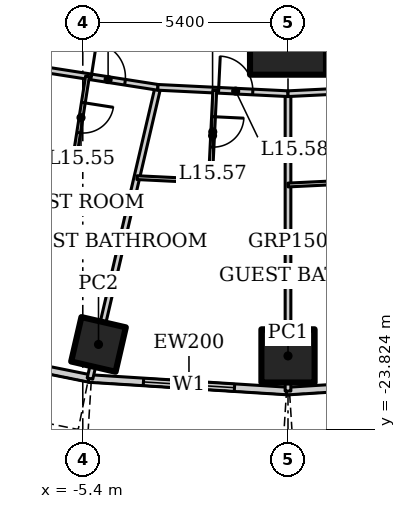
"""IFC4 building model, lengths in metres.
Left out: names, types, materials, properties, quantities, classifications, styles, units other than length and angle.
Written with IfcOpenShell. Run it as: python <this file> out.ifc"""

import sys

from ifc_helpers import new_model, si_unit, direction, frame, frame_2d, origin, origin_2d, place, context, subcontext, project, spatial, rectangle, hollow_rectangle, extrude, element, fill, save


model = new_model("IFC4")
c1 = context("Model", 3, precision=1e-05, world=origin(), true_north=direction((0.0, 1.0)))
c2 = subcontext(c1, "Body", "Model", "MODEL_VIEW")
j1 = project(units=[si_unit("LENGTHUNIT", "METRE"), si_unit("PLANEANGLEUNIT", "RADIAN")], contexts=[c1])
p1 = place(None, origin())
s1 = spatial("IfcSite", under=j1, at=p1, CompositionType="ELEMENT")
p2 = place(p1, origin())
s2 = spatial("IfcBuilding", under=s1, at=p2, CompositionType="ELEMENT")
p3 = place(p2, frame((0.0, 0.0, 69.4)))
s3 = spatial("IfcBuildingStorey", under=s2, at=p3, CompositionType="ELEMENT", Elevation=69.4)
p4 = place(p3, frame((0.0, -13.5, 0.0), z_axis=(0.0, 0.0, 1.0), x_axis=(1.0, 0.0, 0.0)))
e1 = element("IfcColumn", 1, at=p4, inside=s3, PredefinedType="COLUMN", context=c2, shape_type="SweptSolid", body=[
    extrude(hollow_rectangle(XDim=2.0, YDim=2.0, WallThickness=0.17, at=origin_2d()), origin(), (0.0, 0.0, 1.0), 3.6),
])
p5 = place(p3, frame((-4.986, -21.598, 0.0), z_axis=(0.0, 0.0, 1.0), x_axis=(0.224951054344, 0.974370064785, 0.0)))
e2 = element("IfcColumn", 2, at=p5, inside=s3, PredefinedType="COLUMN", context=c2, shape_type="SweptSolid", body=[
    extrude(hollow_rectangle(XDim=1.2, YDim=1.2, WallThickness=0.1, at=origin_2d()), origin(), (0.0, 0.0, 1.0), 3.6),
])
p6 = place(p3, frame((0.0, -21.9, 0.0), z_axis=(0.0, 0.0, 1.0), x_axis=(1.0, 0.0, 0.0)))
e3 = element("IfcColumn", 3, at=p6, inside=s3, PredefinedType="COLUMN", context=c2, shape_type="SweptSolid", body=[
    extrude(hollow_rectangle(XDim=1.4, YDim=1.4, WallThickness=0.1, at=origin_2d()), origin(), (0.0, 0.0, 1.0), 3.6),
])
p7 = place(p3, frame((-10.957, -21.337, 0.0), z_axis=(0.0, 0.0, 1.0), x_axis=(0.980251657452, -0.197754110105, 0.0)))
e4 = element("IfcWall", 4, at=p7, inside=s3, PredefinedType="SOLIDWALL", context=c2, shape_type="SweptSolid", body=[
    extrude(rectangle(XDim=5.904, YDim=0.2, at=frame_2d((2.952, 0.0))), origin(), (0.0, 0.0, 1.0), 3.45),
])
p8 = place(p7, frame((1.752, 0.0, 0.5)))
e5 = element("IfcOpeningElement", 5, at=p8, cuts=e4, PredefinedType="OPENING", context=c2, shape_type="SweptSolid", body=[
    extrude(rectangle(XDim=2.4, YDim=2.2, at=frame_2d((1.2, 1.1))), frame((0.0, 0.11, 0.0), z_axis=(0.0, -1.0, 0.0), x_axis=(1.0, 0.0, 0.0)), (0.0, 0.0, 1.0), 0.22),
])
p9 = place(p3, frame((-5.253, -22.493, 0.0), z_axis=(0.0, 0.0, 1.0), x_axis=(0.998018582375, -0.062919863585, 0.0)))
e6 = element("IfcWall", 6, at=p9, inside=s3, PredefinedType="SOLIDWALL", context=c2, shape_type="SweptSolid", body=[
    extrude(rectangle(XDim=5.304, YDim=0.2, at=frame_2d((2.652, 0.0))), origin(), (0.0, 0.0, 1.0), 3.45),
])
p10 = place(p9, frame((1.452, 0.0, 0.5)))
e7 = element("IfcOpeningElement", 7, at=p10, cuts=e6, PredefinedType="OPENING", context=c2, shape_type="SweptSolid", body=[
    extrude(rectangle(XDim=2.4, YDim=2.2, at=frame_2d((1.2, 1.1))), frame((0.0, 0.11, 0.0), z_axis=(0.0, -1.0, 0.0), x_axis=(1.0, 0.0, 0.0)), (0.0, 0.0, 1.0), 0.22),
])
p11 = place(p3, frame((-0.041, -22.827, 0.0), z_axis=(0.0, 0.0, 1.0), x_axis=(0.998018582375, 0.062919863585, 0.0)))
e8 = element("IfcWall", 8, at=p11, inside=s3, PredefinedType="SOLIDWALL", context=c2, shape_type="SweptSolid", body=[
    extrude(rectangle(XDim=5.304, YDim=0.2, at=frame_2d((2.652, 0.0))), origin(), (0.0, 0.0, 1.0), 3.45),
])
p12 = place(p11, frame((1.452, 0.0, 0.5)))
e9 = element("IfcOpeningElement", 9, at=p12, cuts=e8, PredefinedType="OPENING", context=c2, shape_type="SweptSolid", body=[
    extrude(rectangle(XDim=2.4, YDim=2.2, at=frame_2d((1.2, 1.1))), frame((0.0, 0.11, 0.0), z_axis=(0.0, -1.0, 0.0), x_axis=(1.0, 0.0, 0.0)), (0.0, 0.0, 1.0), 0.22),
])
p13 = place(p3, frame((-5.211, -22.496, 0.0), z_axis=(0.0, 0.0, 1.0), x_axis=(0.227056984461, 0.973881474209, 0.0)))
e10 = element("IfcWall", 10, at=p13, inside=s3, PredefinedType="PARTITIONING", context=c2, shape_type="SweptSolid", body=[
    extrude(rectangle(XDim=7.869, YDim=0.15, at=frame_2d((3.934, 0.0))), origin(), (0.0, 0.0, 1.0), 2.767),
])
p14 = place(p3, frame((0.0, -22.825, 0.0), z_axis=(0.0, 0.0, 1.0), x_axis=(0.0, 1.0, 0.0)))
e11 = element("IfcWall", 11, at=p14, inside=s3, PredefinedType="PARTITIONING", context=c2, shape_type="SweptSolid", body=[
    extrude(rectangle(XDim=7.825, YDim=0.15, at=frame_2d((3.912, 0.0))), origin(), (0.0, 0.0, 1.0), 2.924),
])
p15 = place(p3, frame((-7.253, -14.235, 0.0), z_axis=(0.0, 0.0, 1.0), x_axis=(0.988015036573, -0.154357660987, 0.0)))
e12 = element("IfcWall", 12, at=p15, inside=s3, PredefinedType="PARTITIONING", context=c2, shape_type="SweptSolid", body=[
    extrude(rectangle(XDim=3.875, YDim=0.15, at=frame_2d((1.938, 0.0))), origin(), (0.0, 0.0, 1.0), 3.45),
])
p16 = place(p15, frame((2.1, 0.0, 0.0)))
e13 = element("IfcOpeningElement", 13, at=p16, cuts=e12, PredefinedType="OPENING", context=c2, shape_type="SweptSolid", body=[
    extrude(rectangle(XDim=0.9, YDim=2.1, at=frame_2d((0.45, 1.05))), frame((0.0, 0.085, 0.0), z_axis=(0.0, -1.0, 0.0), x_axis=(1.0, 0.0, 0.0)), (0.0, 0.0, 1.0), 0.17),
])
p17 = place(p3, frame((-3.424, -14.833, 0.0), z_axis=(0.0, 0.0, 1.0), x_axis=(0.998809560203, -0.048779733975, 0.0)))
e14 = element("IfcWall", 14, at=p17, inside=s3, PredefinedType="PARTITIONING", context=c2, shape_type="SweptSolid", body=[
    extrude(rectangle(XDim=3.428, YDim=0.15, at=frame_2d((1.714, 0.0))), origin(), (0.0, 0.0, 1.0), 3.45),
])
p18 = place(p17, frame((1.6, 0.0, 0.0)))
e15 = element("IfcOpeningElement", 15, at=p18, cuts=e14, PredefinedType="OPENING", context=c2, shape_type="SweptSolid", body=[
    extrude(rectangle(XDim=0.9, YDim=2.1, at=frame_2d((0.45, 1.05))), frame((0.0, 0.085, 0.0), z_axis=(0.0, -1.0, 0.0), x_axis=(1.0, 0.0, 0.0)), (0.0, 0.0, 1.0), 0.17),
])
p19 = place(p3, frame((0.0, -15.0, 0.0), z_axis=(0.0, 0.0, 1.0), x_axis=(0.998809560203, 0.048779733975, 0.0)))
e16 = element("IfcWall", 16, at=p19, inside=s3, PredefinedType="PARTITIONING", context=c2, shape_type="SweptSolid", body=[
    extrude(rectangle(XDim=3.428, YDim=0.15, at=frame_2d((1.714, 0.0))), origin(), (0.0, 0.0, 1.0), 3.45),
])
p20 = place(p19, frame((2.378, 0.0, 0.0)))
e17 = element("IfcOpeningElement", 17, at=p20, cuts=e16, PredefinedType="OPENING", context=c2, shape_type="SweptSolid", body=[
    extrude(rectangle(XDim=0.9, YDim=2.1, at=frame_2d((0.45, 1.05))), frame((0.0, 0.085, 0.0), z_axis=(0.0, -1.0, 0.0), x_axis=(1.0, 0.0, 0.0)), (0.0, 0.0, 1.0), 0.17),
])
p21 = place(p3, frame((-5.277, -14.543, 0.0), z_axis=(0.0, 0.0, 1.0), x_axis=(-0.154426532979, -0.988004274238, 0.0)))
e18 = element("IfcWall", 18, at=p21, inside=s3, PredefinedType="PARTITIONING", context=c2, shape_type="SweptSolid", body=[
    extrude(rectangle(XDim=2.4, YDim=0.1, at=frame_2d((1.2, 0.0))), origin(), (0.0, 0.0, 1.0), 3.45),
])
p22 = place(p21, frame((0.7, 0.0, 0.0)))
e19 = element("IfcOpeningElement", 19, at=p22, cuts=e18, PredefinedType="OPENING", context=c2, shape_type="SweptSolid", body=[
    extrude(rectangle(XDim=0.8, YDim=2.1, at=frame_2d((0.4, 1.05))), frame((0.0, 0.06, 0.0), z_axis=(0.0, -1.0, 0.0), x_axis=(1.0, 0.0, 0.0)), (0.0, 0.0, 1.0), 0.12),
])
p23 = place(p3, frame((-5.647, -16.915, 0.0), z_axis=(0.0, 0.0, 1.0), x_axis=(-0.988015375833, 0.154355489429, 0.0)))
e20 = element("IfcWall", 20, at=p23, inside=s3, PredefinedType="PARTITIONING", context=c2, shape_type="SweptSolid", body=[
    extrude(rectangle(XDim=2.785, YDim=0.1, at=frame_2d((1.393, 0.0))), origin(), (0.0, 0.0, 1.0), 3.45),
])
p24 = place(p3, frame((-1.926, -14.906, 0.0), z_axis=(0.0, 0.0, 1.0), x_axis=(-0.048725028858, -0.998812230383, 0.0)))
e21 = element("IfcWall", 21, at=p24, inside=s3, PredefinedType="PARTITIONING", context=c2, shape_type="SweptSolid", body=[
    extrude(rectangle(XDim=2.4, YDim=0.1, at=frame_2d((1.2, 0.0))), origin(), (0.0, 0.0, 1.0), 2.749),
])
p25 = place(p24, frame((0.7, 0.0, 0.0)))
e22 = element("IfcOpeningElement", 22, at=p25, cuts=e21, PredefinedType="OPENING", context=c2, shape_type="SweptSolid", body=[
    extrude(rectangle(XDim=0.8, YDim=2.1, at=frame_2d((0.4, 1.05))), frame((0.0, 0.06, 0.0), z_axis=(0.0, -1.0, 0.0), x_axis=(1.0, 0.0, 0.0)), (0.0, 0.0, 1.0), 0.12),
])
p26 = place(p3, frame((-2.043, -17.303, 0.0), z_axis=(0.0, 0.0, 1.0), x_axis=(-0.998809649749, 0.048777900405, 0.0)))
e23 = element("IfcWall", 23, at=p26, inside=s3, PredefinedType="PARTITIONING", context=c2, shape_type="SweptSolid", body=[
    extrude(rectangle(XDim=1.932, YDim=0.1, at=frame_2d((0.966, 0.0))), origin(), (0.0, 0.0, 1.0), 3.45),
])
p27 = place(p3, frame((2.115, -17.3, 0.0), z_axis=(0.0, 0.0, 1.0), x_axis=(-0.998809749254, -0.048775862842, 0.0)))
e24 = element("IfcWall", 24, at=p27, inside=s3, PredefinedType="PARTITIONING", context=c2, shape_type="SweptSolid", body=[
    extrude(rectangle(XDim=2.117, YDim=0.1, at=frame_2d((1.059, 0.0))), origin(), (0.0, 0.0, 1.0), 3.45),
])
p28 = place(p10, origin())
e25 = element("IfcWindow", 25, at=p28, inside=s3, PartitioningType="SINGLE_PANEL", PredefinedType="WINDOW", context=c2, shape_type="SweptSolid", body=[
    extrude(rectangle(XDim=2.4, YDim=2.2, at=frame_2d((1.2, 1.1))), frame((0.0, 0.03, 0.0), z_axis=(0.0, -1.0, 0.0), x_axis=(1.0, 0.0, 0.0)), (0.0, 0.0, 1.0), 0.06),
])
fill(e7, e25)
p29 = place(p22, origin())
e26 = element("IfcDoor", 26, at=p29, inside=s3, OperationType="SINGLE_SWING_LEFT", PredefinedType="DOOR", context=c2, shape_type="SweptSolid", body=[
    extrude(rectangle(XDim=0.8, YDim=2.1, at=frame_2d((0.4, 1.05))), frame((0.0, 0.025, 0.0), z_axis=(0.0, -1.0, 0.0), x_axis=(1.0, 0.0, 0.0)), (0.0, 0.0, 1.0), 0.05),
])
fill(e19, e26)
p30 = place(p16, origin())
e27 = element("IfcDoor", 27, at=p30, inside=s3, OperationType="SINGLE_SWING_LEFT", PredefinedType="DOOR", context=c2, shape_type="SweptSolid", body=[
    extrude(rectangle(XDim=0.9, YDim=2.1, at=frame_2d((0.45, 1.05))), frame((0.0, 0.025, 0.0), z_axis=(0.0, -1.0, 0.0), x_axis=(1.0, 0.0, 0.0)), (0.0, 0.0, 1.0), 0.05),
])
fill(e13, e27)
p31 = place(p25, origin())
e28 = element("IfcDoor", 28, at=p31, inside=s3, OperationType="SINGLE_SWING_LEFT", PredefinedType="DOOR", context=c2, shape_type="SweptSolid", body=[
    extrude(rectangle(XDim=0.8, YDim=2.1, at=frame_2d((0.4, 1.05))), frame((0.0, 0.025, 0.0), z_axis=(0.0, -1.0, 0.0), x_axis=(1.0, 0.0, 0.0)), (0.0, 0.0, 1.0), 0.05),
])
fill(e22, e28)
p32 = place(p18, origin())
e29 = element("IfcDoor", 29, at=p32, inside=s3, OperationType="SINGLE_SWING_LEFT", PredefinedType="DOOR", context=c2, shape_type="SweptSolid", body=[
    extrude(rectangle(XDim=0.9, YDim=2.1, at=frame_2d((0.45, 1.05))), frame((0.0, 0.025, 0.0), z_axis=(0.0, -1.0, 0.0), x_axis=(1.0, 0.0, 0.0)), (0.0, 0.0, 1.0), 0.05),
])
fill(e15, e29)
save(model, sys.argv[1])
